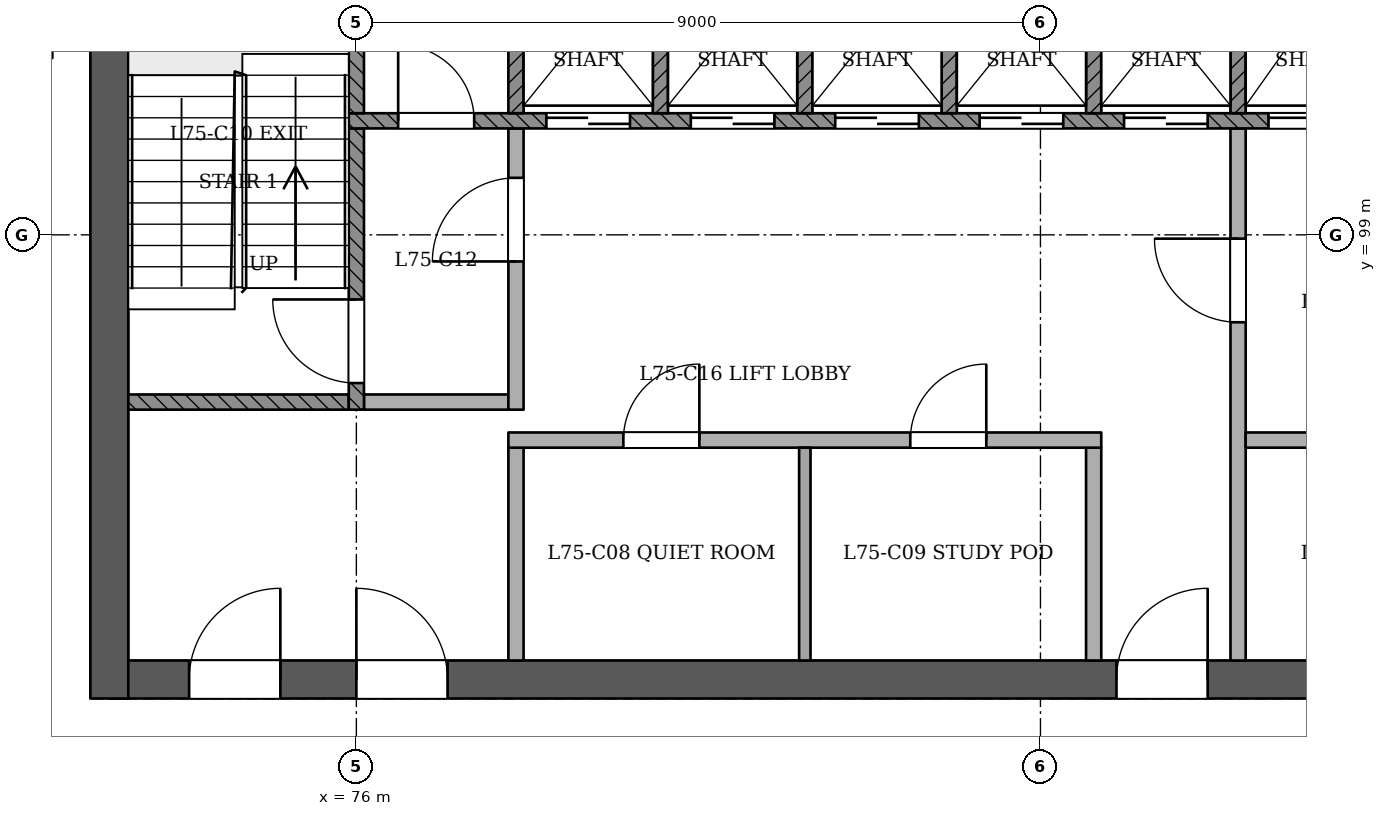
"""IFC4 building model, lengths in metres.
Left out: names, types, materials, properties, quantities, classifications, styles, units other than length and angle.
Written with IfcOpenShell. Run it as: python <this file> out.ifc"""

import sys

from ifc_helpers import new_model, si_unit, direction, frame, frame_2d, origin, place, context, subcontext, project, spatial, rectangle, extrude, element, fill, save


model = new_model("IFC4")
c1 = context("Model", 3, precision=1e-05, world=origin(), true_north=direction((0.0, 1.0)))
c2 = subcontext(c1, "Body", "Model", "MODEL_VIEW")
j1 = project(units=[si_unit("LENGTHUNIT", "METRE"), si_unit("PLANEANGLEUNIT", "RADIAN")], contexts=[c1])
p1 = place(None, origin())
s1 = spatial("IfcSite", under=j1, at=p1, CompositionType="ELEMENT")
p2 = place(p1, origin())
s2 = spatial("IfcBuilding", under=s1, at=p2, CompositionType="ELEMENT")
p3 = place(p2, frame((0.0, 0.0, 291.4)))
s3 = spatial("IfcBuildingStorey", under=s2, at=p3, CompositionType="ELEMENT", Elevation=291.4)
p4 = place(p3, frame((72.75, 93.15, 0.0), z_axis=(0.0, 0.0, 1.0), x_axis=(1.0, 0.0, 0.0)))
e1 = element("IfcWall", 1, at=p4, inside=s3, PredefinedType="SHEAR", context=c2, shape_type="SweptSolid", body=[
    extrude(rectangle(XDim=24.75, YDim=0.5, at=frame_2d((12.375, 0.0))), origin(), (0.0, 0.0, 1.0), 3.6),
])
p5 = place(p4, frame((1.05, 0.0, 0.0)))
e2 = element("IfcOpeningElement", 2, at=p5, cuts=e1, PredefinedType="OPENING", context=c2, shape_type="SweptSolid", body=[
    extrude(rectangle(XDim=1.2, YDim=2.1, at=frame_2d((0.6, 1.05))), frame((0.0, 0.26, 0.0), z_axis=(0.0, -1.0, 0.0), x_axis=(1.0, 0.0, 0.0)), (0.0, 0.0, 1.0), 0.521),
])
p6 = place(p4, frame((3.25, 0.0, 0.0)))
e3 = element("IfcOpeningElement", 3, at=p6, cuts=e1, PredefinedType="OPENING", context=c2, shape_type="SweptSolid", body=[
    extrude(rectangle(XDim=1.2, YDim=2.1, at=frame_2d((0.6, 1.05))), frame((0.0, 0.26, 0.0), z_axis=(0.0, -1.0, 0.0), x_axis=(1.0, 0.0, 0.0)), (0.0, 0.0, 1.0), 0.521),
])
p7 = place(p4, frame((13.25, 0.0, 0.0)))
e4 = element("IfcOpeningElement", 4, at=p7, cuts=e1, PredefinedType="OPENING", context=c2, shape_type="SweptSolid", body=[
    extrude(rectangle(XDim=1.2, YDim=2.1, at=frame_2d((0.6, 1.05))), frame((0.0, 0.26, 0.0), z_axis=(0.0, -1.0, 0.0), x_axis=(1.0, 0.0, 0.0)), (0.0, 0.0, 1.0), 0.521),
])
p8 = place(p4, frame((16.663, 0.0, 0.0)))
e5 = element("IfcOpeningElement", 5, at=p8, cuts=e1, PredefinedType="OPENING", context=c2, shape_type="SweptSolid", body=[
    extrude(rectangle(XDim=1.0, YDim=2.1, at=frame_2d((0.5, 1.05))), frame((0.0, 0.26, 0.0), z_axis=(0.0, -1.0, 0.0), x_axis=(1.0, 0.0, 0.0)), (0.0, 0.0, 1.0), 0.521),
])
p9 = place(p4, frame((20.55, 0.0, 0.0)))
e6 = element("IfcOpeningElement", 6, at=p9, cuts=e1, PredefinedType="OPENING", context=c2, shape_type="SweptSolid", body=[
    extrude(rectangle(XDim=1.0, YDim=2.1, at=frame_2d((0.5, 1.05))), frame((0.0, 0.26, 0.0), z_axis=(0.0, -1.0, 0.0), x_axis=(1.0, 0.0, 0.0)), (0.0, 0.0, 1.0), 0.521),
])
p10 = place(p4, frame((22.988, 0.0, 0.0)))
e7 = element("IfcOpeningElement", 7, at=p10, cuts=e1, PredefinedType="OPENING", context=c2, shape_type="SweptSolid", body=[
    extrude(rectangle(XDim=1.0, YDim=2.1, at=frame_2d((0.5, 1.05))), frame((0.0, 0.26, 0.0), z_axis=(0.0, -1.0, 0.0), x_axis=(1.0, 0.0, 0.0)), (0.0, 0.0, 1.0), 0.521),
])
p11 = place(p3, frame((72.75, 103.65, 0.0), z_axis=(0.0, 0.0, 1.0), x_axis=(0.0, -1.0, 0.0)))
e8 = element("IfcWall", 8, at=p11, inside=s3, PredefinedType="SHEAR", context=c2, shape_type="SweptSolid", body=[
    extrude(rectangle(XDim=10.75, YDim=0.5, at=frame_2d((5.375, 0.0))), origin(), (0.0, 0.0, 1.0), 3.6),
])
p12 = place(p3, frame((78.1, 93.4, 0.0), z_axis=(0.0, 0.0, 1.0), x_axis=(0.0, 1.0, 0.0)))
e9 = element("IfcWall", 9, at=p12, inside=s3, PredefinedType="PARTITIONING", context=c2, shape_type="SweptSolid", body=[
    extrude(rectangle(XDim=2.8, YDim=0.2, at=frame_2d((1.4, 0.0))), origin(), (0.0, 0.0, 1.0), 3.2),
])
p13 = place(p3, frame((81.9, 93.4, 0.0), z_axis=(0.0, 0.0, 1.0), x_axis=(0.0, 1.0, 0.0)))
e10 = element("IfcWall", 10, at=p13, inside=s3, PredefinedType="PARTITIONING", context=c2, shape_type="SweptSolid", body=[
    extrude(rectangle(XDim=2.8, YDim=0.15, at=frame_2d((1.4, 0.0))), origin(), (0.0, 0.0, 1.0), 3.2),
])
p14 = place(p3, frame((85.7, 93.4, 0.0), z_axis=(0.0, 0.0, 1.0), x_axis=(0.0, 1.0, 0.0)))
e11 = element("IfcWall", 11, at=p14, inside=s3, PredefinedType="PARTITIONING", context=c2, shape_type="SweptSolid", body=[
    extrude(rectangle(XDim=2.8, YDim=0.2, at=frame_2d((1.4, 0.0))), origin(), (0.0, 0.0, 1.0), 3.2),
])
p15 = place(p3, frame((87.6, 93.4, 0.0), z_axis=(0.0, 0.0, 1.0), x_axis=(0.0, 1.0, 0.0)))
e12 = element("IfcWall", 12, at=p15, inside=s3, PredefinedType="PARTITIONING", context=c2, shape_type="SweptSolid", body=[
    extrude(rectangle(XDim=7.0, YDim=0.2, at=frame_2d((3.5, 0.0))), origin(), (0.0, 0.0, 1.0), 3.2),
])
p16 = place(p15, frame((4.45, 0.0, 0.0)))
e13 = element("IfcOpeningElement", 13, at=p16, cuts=e12, PredefinedType="OPENING", context=c2, shape_type="SweptSolid", body=[
    extrude(rectangle(XDim=1.1, YDim=2.1, at=frame_2d((0.55, 1.05))), frame((0.0, 0.11, 0.0), z_axis=(0.0, -1.0, 0.0), x_axis=(1.0, 0.0, 0.0)), (0.0, 0.0, 1.0), 0.221),
])
p17 = place(p3, frame((78.0, 96.3, 0.0), z_axis=(0.0, 0.0, 1.0), x_axis=(1.0, 0.0, 0.0)))
e14 = element("IfcWall", 14, at=p17, inside=s3, PredefinedType="PARTITIONING", context=c2, shape_type="SweptSolid", body=[
    extrude(rectangle(XDim=7.8, YDim=0.2, at=frame_2d((3.9, 0.0))), origin(), (0.0, 0.0, 1.0), 3.2),
])
p18 = place(p17, frame((1.512, 0.0, 0.0)))
e15 = element("IfcOpeningElement", 15, at=p18, cuts=e14, PredefinedType="OPENING", context=c2, shape_type="SweptSolid", body=[
    extrude(rectangle(XDim=1.0, YDim=2.1, at=frame_2d((0.5, 1.05))), frame((0.0, 0.11, 0.0), z_axis=(0.0, -1.0, 0.0), x_axis=(1.0, 0.0, 0.0)), (0.0, 0.0, 1.0), 0.221),
])
p19 = place(p17, frame((5.288, 0.0, 0.0)))
e16 = element("IfcOpeningElement", 16, at=p19, cuts=e14, PredefinedType="OPENING", context=c2, shape_type="SweptSolid", body=[
    extrude(rectangle(XDim=1.0, YDim=2.1, at=frame_2d((0.5, 1.05))), frame((0.0, 0.11, 0.0), z_axis=(0.0, -1.0, 0.0), x_axis=(1.0, 0.0, 0.0)), (0.0, 0.0, 1.0), 0.221),
])
p20 = place(p3, frame((87.7, 96.3, 0.0), z_axis=(0.0, 0.0, 1.0), x_axis=(1.0, 0.0, 0.0)))
e17 = element("IfcWall", 17, at=p20, inside=s3, PredefinedType="PARTITIONING", context=c2, shape_type="SweptSolid", body=[
    extrude(rectangle(XDim=3.6, YDim=0.2, at=frame_2d((1.8, 0.0))), origin(), (0.0, 0.0, 1.0), 3.2),
])
p21 = place(p3, frame((73.0, 96.8, 0.0), z_axis=(0.0, 0.0, 1.0), x_axis=(1.0, 0.0, 0.0)))
e18 = element("IfcWall", 18, at=p21, inside=s3, PredefinedType="SOLIDWALL", context=c2, shape_type="SweptSolid", body=[
    extrude(rectangle(XDim=2.9, YDim=0.2, at=frame_2d((1.45, 0.0))), origin(), (0.0, 0.0, 1.0), 3.2),
])
p22 = place(p3, frame((76.0, 96.7, 0.0), z_axis=(0.0, 0.0, 1.0), x_axis=(0.0, 1.0, 0.0)))
e19 = element("IfcWall", 19, at=p22, inside=s3, PredefinedType="SOLIDWALL", context=c2, shape_type="SweptSolid", body=[
    extrude(rectangle(XDim=3.7, YDim=0.2, at=frame_2d((1.85, 0.0))), origin(), (0.0, 0.0, 1.0), 3.2),
])
p23 = place(p22, frame((0.35, 0.0, 0.0)))
e20 = element("IfcOpeningElement", 20, at=p23, cuts=e19, PredefinedType="OPENING", context=c2, shape_type="SweptSolid", body=[
    extrude(rectangle(XDim=1.1, YDim=2.1, at=frame_2d((0.55, 1.05))), frame((0.0, 0.11, 0.0), z_axis=(0.0, -1.0, 0.0), x_axis=(1.0, 0.0, 0.0)), (0.0, 0.0, 1.0), 0.221),
])
p24 = place(p3, frame((76.1, 96.8, 0.0), z_axis=(0.0, 0.0, 1.0), x_axis=(1.0, 0.0, 0.0)))
e21 = element("IfcWall", 21, at=p24, inside=s3, PredefinedType="PARTITIONING", context=c2, shape_type="SweptSolid", body=[
    extrude(rectangle(XDim=1.9, YDim=0.2, at=frame_2d((0.95, 0.0))), origin(), (0.0, 0.0, 1.0), 3.2),
])
p25 = place(p3, frame((78.1, 96.7, 0.0), z_axis=(0.0, 0.0, 1.0), x_axis=(0.0, 1.0, 0.0)))
e22 = element("IfcWall", 22, at=p25, inside=s3, PredefinedType="PARTITIONING", context=c2, shape_type="SweptSolid", body=[
    extrude(rectangle(XDim=3.7, YDim=0.2, at=frame_2d((1.85, 0.0))), origin(), (0.0, 0.0, 1.0), 3.2),
])
p26 = place(p25, frame((1.95, 0.0, 0.0)))
e23 = element("IfcOpeningElement", 23, at=p26, cuts=e22, PredefinedType="OPENING", context=c2, shape_type="SweptSolid", body=[
    extrude(rectangle(XDim=1.1, YDim=2.1, at=frame_2d((0.55, 1.05))), frame((0.0, 0.11, 0.0), z_axis=(0.0, -1.0, 0.0), x_axis=(1.0, 0.0, 0.0)), (0.0, 0.0, 1.0), 0.221),
])
p27 = place(p3, frame((75.9, 100.5, 0.0), z_axis=(0.0, 0.0, 1.0), x_axis=(1.0, 0.0, 0.0)))
e24 = element("IfcWall", 24, at=p27, inside=s3, PredefinedType="SOLIDWALL", context=c2, shape_type="SweptSolid", body=[
    extrude(rectangle(XDim=18.2, YDim=0.2, at=frame_2d((9.1, 0.0))), origin(), (0.0, 0.0, 1.0), 3.2),
])
p28 = place(p27, frame((2.6, 0.0, 0.0)))
e25 = element("IfcOpeningElement", 25, at=p28, cuts=e24, PredefinedType="OPENING", context=c2, shape_type="SweptSolid", body=[
    extrude(rectangle(XDim=1.1, YDim=2.1, at=frame_2d((0.55, 1.05))), frame((0.0, 0.11, 0.0), z_axis=(0.0, -1.0, 0.0), x_axis=(1.0, 0.0, 0.0)), (0.0, 0.0, 1.0), 0.221),
])
p29 = place(p27, frame((4.5, 0.0, 0.0)))
e26 = element("IfcOpeningElement", 26, at=p29, cuts=e24, PredefinedType="OPENING", context=c2, shape_type="SweptSolid", body=[
    extrude(rectangle(XDim=1.1, YDim=2.1, at=frame_2d((0.55, 1.05))), frame((0.0, 0.11, 0.0), z_axis=(0.0, -1.0, 0.0), x_axis=(1.0, 0.0, 0.0)), (0.0, 0.0, 1.0), 0.221),
])
p30 = place(p27, frame((6.4, 0.0, 0.0)))
e27 = element("IfcOpeningElement", 27, at=p30, cuts=e24, PredefinedType="OPENING", context=c2, shape_type="SweptSolid", body=[
    extrude(rectangle(XDim=1.1, YDim=2.1, at=frame_2d((0.55, 1.05))), frame((0.0, 0.11, 0.0), z_axis=(0.0, -1.0, 0.0), x_axis=(1.0, 0.0, 0.0)), (0.0, 0.0, 1.0), 0.221),
])
p31 = place(p27, frame((8.3, 0.0, 0.0)))
e28 = element("IfcOpeningElement", 28, at=p31, cuts=e24, PredefinedType="OPENING", context=c2, shape_type="SweptSolid", body=[
    extrude(rectangle(XDim=1.1, YDim=2.1, at=frame_2d((0.55, 1.05))), frame((0.0, 0.11, 0.0), z_axis=(0.0, -1.0, 0.0), x_axis=(1.0, 0.0, 0.0)), (0.0, 0.0, 1.0), 0.221),
])
p32 = place(p27, frame((10.2, 0.0, 0.0)))
e29 = element("IfcOpeningElement", 29, at=p32, cuts=e24, PredefinedType="OPENING", context=c2, shape_type="SweptSolid", body=[
    extrude(rectangle(XDim=1.1, YDim=2.1, at=frame_2d((0.55, 1.05))), frame((0.0, 0.11, 0.0), z_axis=(0.0, -1.0, 0.0), x_axis=(1.0, 0.0, 0.0)), (0.0, 0.0, 1.0), 0.221),
])
p33 = place(p27, frame((12.1, 0.0, 0.0)))
e30 = element("IfcOpeningElement", 30, at=p33, cuts=e24, PredefinedType="OPENING", context=c2, shape_type="SweptSolid", body=[
    extrude(rectangle(XDim=1.1, YDim=2.1, at=frame_2d((0.55, 1.05))), frame((0.0, 0.11, 0.0), z_axis=(0.0, -1.0, 0.0), x_axis=(1.0, 0.0, 0.0)), (0.0, 0.0, 1.0), 0.221),
])
p34 = place(p27, frame((14.0, 0.0, 0.0)))
e31 = element("IfcOpeningElement", 31, at=p34, cuts=e24, PredefinedType="OPENING", context=c2, shape_type="SweptSolid", body=[
    extrude(rectangle(XDim=1.1, YDim=2.1, at=frame_2d((0.55, 1.05))), frame((0.0, 0.11, 0.0), z_axis=(0.0, -1.0, 0.0), x_axis=(1.0, 0.0, 0.0)), (0.0, 0.0, 1.0), 0.221),
])
p35 = place(p27, frame((0.65, 0.0, 0.0)))
e32 = element("IfcOpeningElement", 32, at=p35, cuts=e24, PredefinedType="OPENING", context=c2, shape_type="SweptSolid", body=[
    extrude(rectangle(XDim=1.0, YDim=2.1, at=frame_2d((0.5, 1.05))), frame((0.0, 0.11, 0.0), z_axis=(0.0, -1.0, 0.0), x_axis=(1.0, 0.0, 0.0)), (0.0, 0.0, 1.0), 0.221),
])
p36 = place(p27, frame((16.3, 0.0, 0.0)))
e33 = element("IfcOpeningElement", 33, at=p36, cuts=e24, PredefinedType="OPENING", context=c2, shape_type="SweptSolid", body=[
    extrude(rectangle(XDim=1.0, YDim=2.1, at=frame_2d((0.5, 1.05))), frame((0.0, 0.11, 0.0), z_axis=(0.0, -1.0, 0.0), x_axis=(1.0, 0.0, 0.0)), (0.0, 0.0, 1.0), 0.221),
])
for number, where, z_axis, x_axis in (
    (34, (76.0, 100.6, 0.0), (0.0, 0.0, 1.0), (0.0, 1.0, 0.0)),
    (35, (78.1, 100.6, 0.0), (0.0, 0.0, 1.0), (0.0, 1.0, 0.0)),
    (36, (80.0, 100.6, 0.0), (0.0, 0.0, 1.0), (0.0, 1.0, 0.0)),
    (37, (81.9, 100.6, 0.0), (0.0, 0.0, 1.0), (0.0, 1.0, 0.0)),
    (38, (83.8, 100.6, 0.0), (0.0, 0.0, 1.0), (0.0, 1.0, 0.0)),
    (39, (85.7, 100.6, 0.0), (0.0, 0.0, 1.0), (0.0, 1.0, 0.0)),
    (40, (87.6, 100.6, 0.0), (0.0, 0.0, 1.0), (0.0, 1.0, 0.0)),
):
    element("IfcWall", number, at=place(p3, frame(where, z_axis=z_axis, x_axis=x_axis)), inside=s3, PredefinedType="SOLIDWALL", context=c2, shape_type="SweptSolid", body=[
        extrude(rectangle(XDim=2.8, YDim=0.2, at=frame_2d((1.4, 0.0))), origin(), (0.0, 0.0, 1.0), 3.2),
    ])
p37 = place(p28, origin())
e41 = element("IfcDoor", 41, at=p37, inside=s3, OperationType="SLIDING_TO_RIGHT", PredefinedType="NOTDEFINED", context=c2, shape_type="SweptSolid", body=[
    extrude(rectangle(XDim=1.1, YDim=2.1, at=frame_2d((0.55, 1.05))), frame((0.0, 0.025, 0.0), z_axis=(0.0, -1.0, 0.0), x_axis=(1.0, 0.0, 0.0)), (0.0, 0.0, 1.0), 0.05),
])
fill(e25, e41)
p38 = place(p29, origin())
e42 = element("IfcDoor", 42, at=p38, inside=s3, OperationType="SLIDING_TO_LEFT", PredefinedType="NOTDEFINED", context=c2, shape_type="SweptSolid", body=[
    extrude(rectangle(XDim=1.1, YDim=2.1, at=frame_2d((0.55, 1.05))), frame((0.0, 0.025, 0.0), z_axis=(0.0, -1.0, 0.0), x_axis=(1.0, 0.0, 0.0)), (0.0, 0.0, 1.0), 0.05),
])
fill(e26, e42)
p39 = place(p30, origin())
e43 = element("IfcDoor", 43, at=p39, inside=s3, OperationType="SLIDING_TO_RIGHT", PredefinedType="NOTDEFINED", context=c2, shape_type="SweptSolid", body=[
    extrude(rectangle(XDim=1.1, YDim=2.1, at=frame_2d((0.55, 1.05))), frame((0.0, 0.025, 0.0), z_axis=(0.0, -1.0, 0.0), x_axis=(1.0, 0.0, 0.0)), (0.0, 0.0, 1.0), 0.05),
])
fill(e27, e43)
p40 = place(p31, origin())
e44 = element("IfcDoor", 44, at=p40, inside=s3, OperationType="SLIDING_TO_LEFT", PredefinedType="NOTDEFINED", context=c2, shape_type="SweptSolid", body=[
    extrude(rectangle(XDim=1.1, YDim=2.1, at=frame_2d((0.55, 1.05))), frame((0.0, 0.025, 0.0), z_axis=(0.0, -1.0, 0.0), x_axis=(1.0, 0.0, 0.0)), (0.0, 0.0, 1.0), 0.05),
])
fill(e28, e44)
p41 = place(p32, origin())
e45 = element("IfcDoor", 45, at=p41, inside=s3, OperationType="SLIDING_TO_RIGHT", PredefinedType="NOTDEFINED", context=c2, shape_type="SweptSolid", body=[
    extrude(rectangle(XDim=1.1, YDim=2.1, at=frame_2d((0.55, 1.05))), frame((0.0, 0.025, 0.0), z_axis=(0.0, -1.0, 0.0), x_axis=(1.0, 0.0, 0.0)), (0.0, 0.0, 1.0), 0.05),
])
fill(e29, e45)
p42 = place(p33, origin())
e46 = element("IfcDoor", 46, at=p42, inside=s3, OperationType="SLIDING_TO_RIGHT", PredefinedType="NOTDEFINED", context=c2, shape_type="SweptSolid", body=[
    extrude(rectangle(XDim=1.1, YDim=2.1, at=frame_2d((0.55, 1.05))), frame((0.0, 0.025, 0.0), z_axis=(0.0, -1.0, 0.0), x_axis=(1.0, 0.0, 0.0)), (0.0, 0.0, 1.0), 0.05),
])
fill(e30, e46)
p43 = place(p23, origin())
e47 = element("IfcDoor", 47, at=p43, inside=s3, OperationType="SINGLE_SWING_RIGHT", PredefinedType="NOTDEFINED", context=c2, shape_type="SweptSolid", body=[
    extrude(rectangle(XDim=1.1, YDim=2.1, at=frame_2d((0.55, 1.05))), frame((0.0, 0.025, 0.0), z_axis=(0.0, -1.0, 0.0), x_axis=(1.0, 0.0, 0.0)), (0.0, 0.0, 1.0), 0.05),
])
fill(e20, e47)
p44 = place(p26, origin())
e48 = element("IfcDoor", 48, at=p44, inside=s3, OperationType="SINGLE_SWING_LEFT", PredefinedType="NOTDEFINED", context=c2, shape_type="SweptSolid", body=[
    extrude(rectangle(XDim=1.1, YDim=2.1, at=frame_2d((0.55, 1.05))), frame((0.0, 0.025, 0.0), z_axis=(0.0, -1.0, 0.0), x_axis=(1.0, 0.0, 0.0)), (0.0, 0.0, 1.0), 0.05),
])
fill(e23, e48)
p45 = place(p16, origin())
e49 = element("IfcDoor", 49, at=p45, inside=s3, OperationType="SINGLE_SWING_RIGHT", PredefinedType="NOTDEFINED", context=c2, shape_type="SweptSolid", body=[
    extrude(rectangle(XDim=1.1, YDim=2.1, at=frame_2d((0.55, 1.05))), frame((0.0, 0.025, 0.0), z_axis=(0.0, -1.0, 0.0), x_axis=(1.0, 0.0, 0.0)), (0.0, 0.0, 1.0), 0.05),
])
fill(e13, e49)
p46 = place(p5, origin())
e50 = element("IfcDoor", 50, at=p46, inside=s3, OperationType="SINGLE_SWING_RIGHT", PredefinedType="NOTDEFINED", context=c2, shape_type="SweptSolid", body=[
    extrude(rectangle(XDim=1.2, YDim=2.1, at=frame_2d((0.6, 1.05))), frame((0.0, 0.025, 0.0), z_axis=(0.0, -1.0, 0.0), x_axis=(1.0, 0.0, 0.0)), (0.0, 0.0, 1.0), 0.05),
])
fill(e2, e50)
p47 = place(p6, origin())
e51 = element("IfcDoor", 51, at=p47, inside=s3, OperationType="SINGLE_SWING_LEFT", PredefinedType="NOTDEFINED", context=c2, shape_type="SweptSolid", body=[
    extrude(rectangle(XDim=1.2, YDim=2.1, at=frame_2d((0.6, 1.05))), frame((0.0, 0.025, 0.0), z_axis=(0.0, -1.0, 0.0), x_axis=(1.0, 0.0, 0.0)), (0.0, 0.0, 1.0), 0.05),
])
fill(e3, e51)
p48 = place(p7, origin())
e52 = element("IfcDoor", 52, at=p48, inside=s3, OperationType="SINGLE_SWING_RIGHT", PredefinedType="NOTDEFINED", context=c2, shape_type="SweptSolid", body=[
    extrude(rectangle(XDim=1.2, YDim=2.1, at=frame_2d((0.6, 1.05))), frame((0.0, 0.025, 0.0), z_axis=(0.0, -1.0, 0.0), x_axis=(1.0, 0.0, 0.0)), (0.0, 0.0, 1.0), 0.05),
])
fill(e4, e52)
p49 = place(p35, origin())
e53 = element("IfcDoor", 53, at=p49, inside=s3, OperationType="SINGLE_SWING_LEFT", PredefinedType="NOTDEFINED", context=c2, shape_type="SweptSolid", body=[
    extrude(rectangle(XDim=1.0, YDim=2.1, at=frame_2d((0.5, 1.05))), frame((0.0, 0.025, 0.0), z_axis=(0.0, -1.0, 0.0), x_axis=(1.0, 0.0, 0.0)), (0.0, 0.0, 1.0), 0.05),
])
fill(e32, e53)
p50 = place(p18, origin())
e54 = element("IfcDoor", 54, at=p50, inside=s3, OperationType="SINGLE_SWING_RIGHT", PredefinedType="NOTDEFINED", context=c2, shape_type="SweptSolid", body=[
    extrude(rectangle(XDim=1.0, YDim=2.1, at=frame_2d((0.5, 1.05))), frame((0.0, 0.025, 0.0), z_axis=(0.0, -1.0, 0.0), x_axis=(1.0, 0.0, 0.0)), (0.0, 0.0, 1.0), 0.05),
])
fill(e15, e54)
p51 = place(p19, origin())
e55 = element("IfcDoor", 55, at=p51, inside=s3, OperationType="SINGLE_SWING_RIGHT", PredefinedType="NOTDEFINED", context=c2, shape_type="SweptSolid", body=[
    extrude(rectangle(XDim=1.0, YDim=2.1, at=frame_2d((0.5, 1.05))), frame((0.0, 0.025, 0.0), z_axis=(0.0, -1.0, 0.0), x_axis=(1.0, 0.0, 0.0)), (0.0, 0.0, 1.0), 0.05),
])
fill(e16, e55)
save(model, sys.argv[1])
